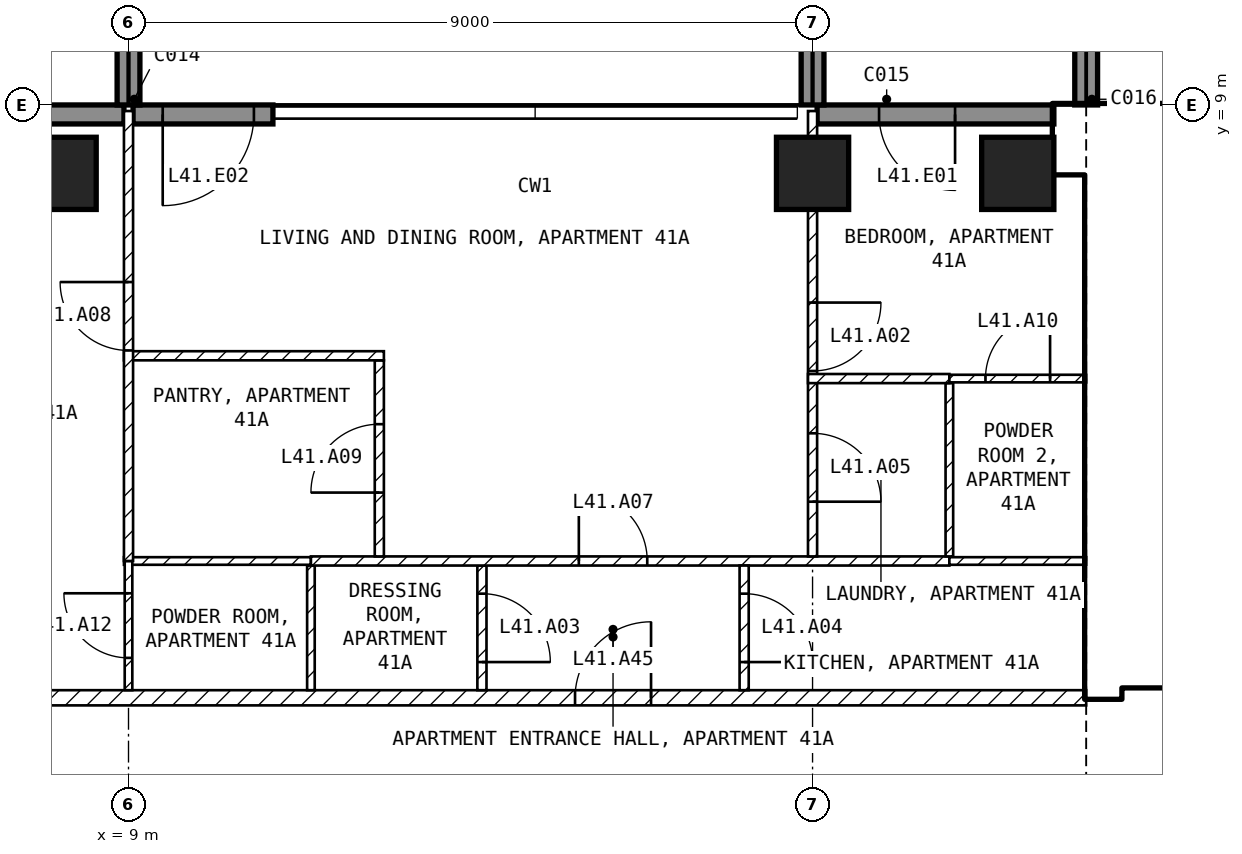
"""IFC4 building model, lengths in metres.
Left out: names, types, materials, properties, quantities, classifications, styles, units other than length and angle.
Written with IfcOpenShell. Run it as: python <this file> out.ifc"""

import sys

from ifc_helpers import new_model, si_unit, direction, frame, frame_2d, origin, origin_2d, place, context, subcontext, project, spatial, rectangle, extrude, element, fill, save


model = new_model("IFC4")
c1 = context("Model", 3, precision=1e-05, world=origin(), true_north=direction((0.0, 1.0)))
c2 = subcontext(c1, "Body", "Model", "MODEL_VIEW")
j1 = project(units=[si_unit("LENGTHUNIT", "METRE"), si_unit("PLANEANGLEUNIT", "RADIAN")], contexts=[c1])
p1 = place(None, origin())
s1 = spatial("IfcSite", under=j1, at=p1, CompositionType="ELEMENT")
p2 = place(p1, origin())
s2 = spatial("IfcBuilding", under=s1, at=p2, CompositionType="ELEMENT")
p3 = place(p2, frame((0.0, 0.0, 170.1)))
s3 = spatial("IfcBuildingStorey", under=s2, at=p3, CompositionType="ELEMENT", Elevation=170.1)
for number, where, z_axis, x_axis in (
    (1, (8.1, 8.1, -0.25), (0.0, 0.0, 1.0), (1.0, 0.0, 0.0)),
    (2, (18.0, 8.1, -0.25), (0.0, 0.0, 1.0), (1.0, 0.0, 0.0)),
    (3, (20.7, 8.1, -0.25), (0.0, 0.0, 1.0), (1.0, 0.0, 0.0)),
):
    element("IfcColumn", number, at=place(p3, frame(where, z_axis=z_axis, x_axis=x_axis)), inside=s3, PredefinedType="COLUMN", context=c2, shape_type="SweptSolid", body=[
        extrude(rectangle(XDim=0.95, YDim=0.95, at=origin_2d()), origin(), (0.0, 0.0, 1.0), 3.5),
    ])
p4 = place(p3, frame((21.175, 8.875, 0.0), z_axis=(0.0, 0.0, 1.0), x_axis=(-1.0, 0.0, 0.0)))
e4 = element("IfcWall", 4, at=p4, inside=s3, PredefinedType="SOLIDWALL", context=c2, shape_type="SweptSolid", body=[
    extrude(rectangle(XDim=3.115, YDim=0.25, at=frame_2d((1.558, 0.0))), origin(), (0.0, 0.0, 1.0), 3.25),
])
p5 = place(p4, frame((1.3, 0.0, 0.0)))
e5 = element("IfcOpeningElement", 5, at=p5, cuts=e4, PredefinedType="OPENING", context=c2, shape_type="SweptSolid", body=[
    extrude(rectangle(XDim=1.0, YDim=2.4, at=frame_2d((0.5, 1.2))), frame((0.0, 0.135, 0.0), z_axis=(0.0, -1.0, 0.0), x_axis=(1.0, 0.0, 0.0)), (0.0, 0.0, 1.0), 0.27),
])
p6 = place(p3, frame((10.9, 8.875, 0.0), z_axis=(0.0, 0.0, 1.0), x_axis=(-1.0, 0.0, 0.0)))
e6 = element("IfcWall", 6, at=p6, inside=s3, PredefinedType="SOLIDWALL", context=c2, shape_type="SweptSolid", body=[
    extrude(rectangle(XDim=1.84, YDim=0.25, at=frame_2d((0.92, 0.0))), origin(), (0.0, 0.0, 1.0), 3.25),
])
p7 = place(p6, frame((0.25, 0.0, 0.0)))
e7 = element("IfcOpeningElement", 7, at=p7, cuts=e6, PredefinedType="OPENING", context=c2, shape_type="SweptSolid", body=[
    extrude(rectangle(XDim=1.2, YDim=2.4, at=frame_2d((0.6, 1.2))), frame((0.0, 0.135, 0.0), z_axis=(0.0, -1.0, 0.0), x_axis=(1.0, 0.0, 0.0)), (0.0, 0.0, 1.0), 0.27),
])
p8 = place(p3, frame((8.94, 8.875, 0.0), z_axis=(0.0, 0.0, 1.0), x_axis=(-1.0, 0.0, 0.0)))
e8 = element("IfcWall", 8, at=p8, inside=s3, PredefinedType="SOLIDWALL", context=c2, shape_type="SweptSolid", body=[
    extrude(rectangle(XDim=3.115, YDim=0.25, at=frame_2d((1.558, 0.0))), origin(), (0.0, 0.0, 1.0), 3.25),
])
p9 = place(p8, frame((1.665, 0.0, 0.0)))
e9 = element("IfcOpeningElement", 9, at=p9, cuts=e8, PredefinedType="OPENING", context=c2, shape_type="SweptSolid", body=[
    extrude(rectangle(XDim=1.2, YDim=2.4, at=frame_2d((0.6, 1.2))), frame((0.0, 0.135, 0.0), z_axis=(0.0, -1.0, 0.0), x_axis=(1.0, 0.0, 0.0)), (0.0, 0.0, 1.0), 0.27),
])
for number, where, z_axis, x_axis in (
    (10, (9.0, 9.0, 0.0), (0.0, 0.0, 1.0), (0.0, 1.0, 0.0)),
    (11, (18.0, 9.0, 0.0), (0.0, 0.0, 1.0), (0.0, 1.0, 0.0)),
    (12, (21.6, 9.0, 0.0), (0.0, 0.0, 1.0), (0.0, 1.0, 0.0)),
):
    element("IfcWall", number, at=place(p3, frame(where, z_axis=z_axis, x_axis=x_axis)), inside=s3, PredefinedType="SOLIDWALL", context=c2, shape_type="SweptSolid", body=[
        extrude(rectangle(XDim=2.7, YDim=0.3, at=frame_2d((1.35, 0.0))), origin(), (0.0, 0.0, 1.0), 3.25),
    ])
p10 = place(p3, frame((21.175, 8.55, 0.0), z_axis=(0.0, 0.0, 1.0), x_axis=(1.0, 0.0, 0.0)))
e13 = element("IfcWall", 13, at=p10, inside=s3, PredefinedType="SHEAR", context=c2, shape_type="SweptSolid", body=[
    extrude(rectangle(XDim=8.425, YDim=0.9, at=frame_2d((4.212, 0.0))), origin(), (0.0, 0.0, 1.0), 3.25),
])
p11 = place(p3, frame((21.825, 1.2, 0.0), z_axis=(0.0, 0.0, 1.0), x_axis=(0.0, 1.0, 0.0)))
e14 = element("IfcWall", 14, at=p11, inside=s3, PredefinedType="SHEAR", context=c2, shape_type="SweptSolid", body=[
    extrude(rectangle(XDim=6.9, YDim=0.45, at=frame_2d((3.45, 0.0))), origin(), (0.0, 0.0, 1.0), 3.25),
])
p12 = place(p3, frame((22.05, 1.45, 0.0), z_axis=(0.0, 0.0, 1.0), x_axis=(1.0, 0.0, 0.0)))
e15 = element("IfcWall", 15, at=p12, inside=s3, PredefinedType="SOLIDWALL", context=c2, shape_type="SweptSolid", body=[
    extrude(rectangle(XDim=11.15, YDim=0.2, at=frame_2d((5.575, 0.0))), origin(), (0.0, 0.0, 1.0), 3.25),
])
p13 = place(p12, frame((0.75, 0.0, 0.0)))
e16 = element("IfcOpeningElement", 16, at=p13, cuts=e15, PredefinedType="OPENING", context=c2, shape_type="SweptSolid", body=[
    extrude(rectangle(XDim=1.0, YDim=2.1, at=frame_2d((0.5, 1.05))), frame((0.0, 0.11, 0.0), z_axis=(0.0, -1.0, 0.0), x_axis=(1.0, 0.0, 0.0)), (0.0, 0.0, 1.0), 0.22),
])
p14 = place(p12, frame((3.25, 0.0, 0.0)))
e17 = element("IfcOpeningElement", 17, at=p14, cuts=e15, PredefinedType="OPENING", context=c2, shape_type="SweptSolid", body=[
    extrude(rectangle(XDim=1.0, YDim=2.1, at=frame_2d((0.5, 1.05))), frame((0.0, 0.11, 0.0), z_axis=(0.0, -1.0, 0.0), x_axis=(1.0, 0.0, 0.0)), (0.0, 0.0, 1.0), 0.22),
])
p15 = place(p12, frame((9.15, 0.0, 0.0)))
e18 = element("IfcOpeningElement", 18, at=p15, cuts=e15, PredefinedType="OPENING", context=c2, shape_type="SweptSolid", body=[
    extrude(rectangle(XDim=0.9, YDim=2.1, at=frame_2d((0.45, 1.05))), frame((0.0, 0.11, 0.0), z_axis=(0.0, -1.0, 0.0), x_axis=(1.0, 0.0, 0.0)), (0.0, 0.0, 1.0), 0.22),
])
p16 = place(p3, frame((22.05, 5.15, 0.0), z_axis=(0.0, 0.0, 1.0), x_axis=(1.0, 0.0, 0.0)))
e19 = element("IfcWall", 19, at=p16, inside=s3, PredefinedType="SOLIDWALL", context=c2, shape_type="SweptSolid", body=[
    extrude(rectangle(XDim=6.3, YDim=0.2, at=frame_2d((3.15, 0.0))), origin(), (0.0, 0.0, 1.0), 3.25),
])
p17 = place(p16, frame((0.2, 0.0, 0.0)))
e20 = element("IfcOpeningElement", 20, at=p17, cuts=e19, PredefinedType="OPENING", context=c2, shape_type="SweptSolid", body=[
    extrude(rectangle(XDim=1.0, YDim=2.1, at=frame_2d((0.5, 1.05))), frame((0.0, 0.11, 0.0), z_axis=(0.0, -1.0, 0.0), x_axis=(1.0, 0.0, 0.0)), (0.0, 0.0, 1.0), 0.22),
])
p18 = place(p3, frame((4.4, 1.2, 0.0), z_axis=(0.0, 0.0, 1.0), x_axis=(1.0, 0.0, 0.0)))
e21 = element("IfcWall", 21, at=p18, inside=s3, PredefinedType="PARTITIONING", context=c2, shape_type="SweptSolid", body=[
    extrude(rectangle(XDim=17.2, YDim=0.2, at=frame_2d((8.6, 0.0))), origin(), (0.0, 0.0, 1.0), 3.25),
])
p19 = place(p18, frame((10.475, 0.0, 0.0)))
e22 = element("IfcOpeningElement", 22, at=p19, cuts=e21, PredefinedType="OPENING", context=c2, shape_type="SweptSolid", body=[
    extrude(rectangle(XDim=1.0, YDim=2.1, at=frame_2d((0.5, 1.05))), frame((0.0, 0.11, 0.0), z_axis=(0.0, -1.0, 0.0), x_axis=(1.0, 0.0, 0.0)), (0.0, 0.0, 1.0), 0.22),
])
p20 = place(p3, frame((11.4, 2.94, 0.0), z_axis=(0.0, 0.0, 1.0), x_axis=(0.0, -1.0, 0.0)))
e23 = element("IfcWall", 23, at=p20, inside=s3, PredefinedType="PARTITIONING", context=c2, shape_type="SweptSolid", body=[
    extrude(rectangle(XDim=1.64, YDim=0.1, at=frame_2d((0.82, 0.0))), origin(), (0.0, 0.0, 1.0), 3.25),
])
p21 = place(p3, frame((8.94, 3.0, 0.0), z_axis=(0.0, 0.0, 1.0), x_axis=(1.0, 0.0, 0.0)))
e24 = element("IfcWall", 24, at=p21, inside=s3, PredefinedType="PARTITIONING", context=c2, shape_type="SweptSolid", body=[
    extrude(rectangle(XDim=2.46, YDim=0.1, at=frame_2d((1.23, 0.0))), origin(), (0.0, 0.0, 1.0), 3.25),
])
p22 = place(p3, frame((9.0, 1.3, 0.0), z_axis=(0.0, 0.0, 1.0), x_axis=(0.0, 1.0, 0.0)))
e25 = element("IfcWall", 25, at=p22, inside=s3, PredefinedType="PARTITIONING", context=c2, shape_type="SweptSolid", body=[
    extrude(rectangle(XDim=1.7, YDim=0.1, at=frame_2d((0.85, 0.0))), origin(), (0.0, 0.0, 1.0), 3.25),
])
p23 = place(p22, frame((0.425, 0.0, 0.0)))
e26 = element("IfcOpeningElement", 26, at=p23, cuts=e25, PredefinedType="OPENING", context=c2, shape_type="SweptSolid", body=[
    extrude(rectangle(XDim=0.85, YDim=2.1, at=frame_2d((0.425, 1.05))), frame((0.0, 0.06, 0.0), z_axis=(0.0, -1.0, 0.0), x_axis=(1.0, 0.0, 0.0)), (0.0, 0.0, 1.0), 0.12),
])
p24 = place(p3, frame((13.65, 2.94, 0.0), z_axis=(0.0, 0.0, 1.0), x_axis=(0.0, -1.0, 0.0)))
e27 = element("IfcWall", 27, at=p24, inside=s3, PredefinedType="PARTITIONING", context=c2, shape_type="SweptSolid", body=[
    extrude(rectangle(XDim=1.64, YDim=0.12, at=frame_2d((0.82, 0.0))), origin(), (0.0, 0.0, 1.0), 3.25),
])
p25 = place(p24, frame((0.37, 0.0, 0.0)))
e28 = element("IfcOpeningElement", 28, at=p25, cuts=e27, PredefinedType="OPENING", context=c2, shape_type="SweptSolid", body=[
    extrude(rectangle(XDim=0.9, YDim=2.1, at=frame_2d((0.45, 1.05))), frame((0.0, 0.07, 0.0), z_axis=(0.0, -1.0, 0.0), x_axis=(1.0, 0.0, 0.0)), (0.0, 0.0, 1.0), 0.14),
])
p26 = place(p3, frame((11.4, 3.0, 0.0), z_axis=(0.0, 0.0, 1.0), x_axis=(1.0, 0.0, 0.0)))
e29 = element("IfcWall", 29, at=p26, inside=s3, PredefinedType="PARTITIONING", context=c2, shape_type="SweptSolid", body=[
    extrude(rectangle(XDim=8.4, YDim=0.12, at=frame_2d((4.2, 0.0))), origin(), (0.0, 0.0, 1.0), 3.25),
])
p27 = place(p26, frame((3.525, 0.0, 0.0)))
e30 = element("IfcOpeningElement", 30, at=p27, cuts=e29, PredefinedType="OPENING", context=c2, shape_type="SweptSolid", body=[
    extrude(rectangle(XDim=0.9, YDim=2.1, at=frame_2d((0.45, 1.05))), frame((0.0, 0.07, 0.0), z_axis=(0.0, -1.0, 0.0), x_axis=(1.0, 0.0, 0.0)), (0.0, 0.0, 1.0), 0.14),
])
p28 = place(p3, frame((17.1, 2.94, 0.0), z_axis=(0.0, 0.0, 1.0), x_axis=(0.0, -1.0, 0.0)))
e31 = element("IfcWall", 31, at=p28, inside=s3, PredefinedType="PARTITIONING", context=c2, shape_type="SweptSolid", body=[
    extrude(rectangle(XDim=1.64, YDim=0.12, at=frame_2d((0.82, 0.0))), origin(), (0.0, 0.0, 1.0), 3.25),
])
p29 = place(p28, frame((0.37, 0.0, 0.0)))
e32 = element("IfcOpeningElement", 32, at=p29, cuts=e31, PredefinedType="OPENING", context=c2, shape_type="SweptSolid", body=[
    extrude(rectangle(XDim=0.9, YDim=2.1, at=frame_2d((0.45, 1.05))), frame((0.0, 0.07, 0.0), z_axis=(0.0, -1.0, 0.0), x_axis=(1.0, 0.0, 0.0)), (0.0, 0.0, 1.0), 0.14),
])
p30 = place(p3, frame((19.8, 3.0, 0.0), z_axis=(0.0, 0.0, 1.0), x_axis=(1.0, 0.0, 0.0)))
e33 = element("IfcWall", 33, at=p30, inside=s3, PredefinedType="PARTITIONING", context=c2, shape_type="SweptSolid", body=[
    extrude(rectangle(XDim=1.8, YDim=0.1, at=frame_2d((0.9, 0.0))), origin(), (0.0, 0.0, 1.0), 3.25),
])
p31 = place(p3, frame((12.3, 3.06, 0.0), z_axis=(0.0, 0.0, 1.0), x_axis=(0.0, 1.0, 0.0)))
e34 = element("IfcWall", 34, at=p31, inside=s3, PredefinedType="PARTITIONING", context=c2, shape_type="SweptSolid", body=[
    extrude(rectangle(XDim=2.58, YDim=0.12, at=frame_2d((1.29, 0.0))), origin(), (0.0, 0.0, 1.0), 3.25),
])
p32 = place(p31, frame((0.84, 0.0, 0.0)))
e35 = element("IfcOpeningElement", 35, at=p32, cuts=e34, PredefinedType="OPENING", context=c2, shape_type="SweptSolid", body=[
    extrude(rectangle(XDim=0.9, YDim=2.1, at=frame_2d((0.45, 1.05))), frame((0.0, 0.07, 0.0), z_axis=(0.0, -1.0, 0.0), x_axis=(1.0, 0.0, 0.0)), (0.0, 0.0, 1.0), 0.14),
])
p33 = place(p3, frame((12.36, 5.7, 0.0), z_axis=(0.0, 0.0, 1.0), x_axis=(-1.0, 0.0, 0.0)))
e36 = element("IfcWall", 36, at=p33, inside=s3, PredefinedType="PARTITIONING", context=c2, shape_type="SweptSolid", body=[
    extrude(rectangle(XDim=3.42, YDim=0.12, at=frame_2d((1.71, 0.0))), origin(), (0.0, 0.0, 1.0), 3.25),
])
p34 = place(p3, frame((18.0, 8.92, 0.0), z_axis=(0.0, 0.0, 1.0), x_axis=(0.0, -1.0, 0.0)))
e37 = element("IfcWall", 37, at=p34, inside=s3, PredefinedType="PARTITIONING", context=c2, shape_type="SweptSolid", body=[
    extrude(rectangle(XDim=5.86, YDim=0.12, at=frame_2d((2.93, 0.0))), origin(), (0.0, 0.0, 1.0), 2.48),
])
p35 = place(p34, frame((2.52, 0.0, 0.0)))
e38 = element("IfcOpeningElement", 38, at=p35, cuts=e37, PredefinedType="OPENING", context=c2, shape_type="SweptSolid", body=[
    extrude(rectangle(XDim=0.9, YDim=2.1, at=frame_2d((0.45, 1.05))), frame((0.0, 0.07, 0.0), z_axis=(0.0, -1.0, 0.0), x_axis=(1.0, 0.0, 0.0)), (0.0, 0.0, 1.0), 0.14),
])
p36 = place(p34, frame((4.24, 0.0, 0.0)))
e39 = element("IfcOpeningElement", 39, at=p36, cuts=e37, PredefinedType="OPENING", context=c2, shape_type="SweptSolid", body=[
    extrude(rectangle(XDim=0.9, YDim=2.1, at=frame_2d((0.45, 1.05))), frame((0.0, 0.07, 0.0), z_axis=(0.0, -1.0, 0.0), x_axis=(1.0, 0.0, 0.0)), (0.0, 0.0, 1.0), 0.14),
])
p37 = place(p3, frame((9.0, 3.0, 0.0), z_axis=(0.0, 0.0, 1.0), x_axis=(0.0, 1.0, 0.0)))
e40 = element("IfcWall", 40, at=p37, inside=s3, PredefinedType="PARTITIONING", context=c2, shape_type="SweptSolid", body=[
    extrude(rectangle(XDim=5.92, YDim=0.12, at=frame_2d((2.96, 0.0))), origin(), (0.0, 0.0, 1.0), 3.25),
])
p38 = place(p37, frame((2.77, 0.0, 0.0)))
e41 = element("IfcOpeningElement", 41, at=p38, cuts=e40, PredefinedType="OPENING", context=c2, shape_type="SweptSolid", body=[
    extrude(rectangle(XDim=0.9, YDim=2.1, at=frame_2d((0.45, 1.05))), frame((0.0, 0.07, 0.0), z_axis=(0.0, -1.0, 0.0), x_axis=(1.0, 0.0, 0.0)), (0.0, 0.0, 1.0), 0.14),
])
p39 = place(p3, frame((19.8, 5.34, 0.0), z_axis=(0.0, 0.0, 1.0), x_axis=(0.0, -1.0, 0.0)))
e42 = element("IfcWall", 42, at=p39, inside=s3, PredefinedType="PARTITIONING", context=c2, shape_type="SweptSolid", body=[
    extrude(rectangle(XDim=2.28, YDim=0.1, at=frame_2d((1.14, 0.0))), origin(), (0.0, 0.0, 1.0), 3.25),
])
p40 = place(p3, frame((17.94, 5.4, 0.0), z_axis=(0.0, 0.0, 1.0), x_axis=(1.0, 0.0, 0.0)))
e43 = element("IfcWall", 43, at=p40, inside=s3, PredefinedType="PARTITIONING", context=c2, shape_type="SweptSolid", body=[
    extrude(rectangle(XDim=1.86, YDim=0.12, at=frame_2d((0.93, 0.0))), origin(), (0.0, 0.0, 1.0), 3.25),
])
p41 = place(p3, frame((19.8, 5.4, 0.0), z_axis=(0.0, 0.0, 1.0), x_axis=(1.0, 0.0, 0.0)))
e44 = element("IfcWall", 44, at=p41, inside=s3, PredefinedType="PARTITIONING", context=c2, shape_type="SweptSolid", body=[
    extrude(rectangle(XDim=1.8, YDim=0.1, at=frame_2d((0.9, 0.0))), origin(), (0.0, 0.0, 1.0), 3.25),
])
p42 = place(p41, frame((0.475, 0.0, 0.0)))
e45 = element("IfcOpeningElement", 45, at=p42, cuts=e44, PredefinedType="OPENING", context=c2, shape_type="SweptSolid", body=[
    extrude(rectangle(XDim=0.85, YDim=2.1, at=frame_2d((0.425, 1.05))), frame((0.0, 0.06, 0.0), z_axis=(0.0, -1.0, 0.0), x_axis=(1.0, 0.0, 0.0)), (0.0, 0.0, 1.0), 0.12),
])
p43 = place(p5, origin())
e46 = element("IfcDoor", 46, at=p43, inside=s3, OperationType="SINGLE_SWING_LEFT", PredefinedType="DOOR", context=c2, shape_type="SweptSolid", body=[
    extrude(rectangle(XDim=1.0, YDim=2.4, at=frame_2d((0.5, 1.2))), frame((0.0, 0.025, 0.0), z_axis=(0.0, -1.0, 0.0), x_axis=(1.0, 0.0, 0.0)), (0.0, 0.0, 1.0), 0.05),
])
fill(e5, e46)
p44 = place(p7, origin())
e47 = element("IfcDoor", 47, at=p44, inside=s3, OperationType="SINGLE_SWING_RIGHT", PredefinedType="DOOR", context=c2, shape_type="SweptSolid", body=[
    extrude(rectangle(XDim=1.2, YDim=2.4, at=frame_2d((0.6, 1.2))), frame((0.0, 0.025, 0.0), z_axis=(0.0, -1.0, 0.0), x_axis=(1.0, 0.0, 0.0)), (0.0, 0.0, 1.0), 0.05),
])
fill(e7, e47)
p45 = place(p17, origin())
e48 = element("IfcDoor", 48, at=p45, inside=s3, OperationType="SINGLE_SWING_LEFT", PredefinedType="DOOR", context=c2, shape_type="SweptSolid", body=[
    extrude(rectangle(XDim=1.0, YDim=2.1, at=frame_2d((0.5, 1.05))), frame((0.0, 0.025, 0.0), z_axis=(0.0, -1.0, 0.0), x_axis=(1.0, 0.0, 0.0)), (0.0, 0.0, 1.0), 0.05),
])
fill(e20, e48)
p46 = place(p35, origin())
e49 = element("IfcDoor", 49, at=p46, inside=s3, OperationType="SINGLE_SWING_LEFT", PredefinedType="DOOR", context=c2, shape_type="SweptSolid", body=[
    extrude(rectangle(XDim=0.9, YDim=2.1, at=frame_2d((0.45, 1.05))), frame((0.0, 0.025, 0.0), z_axis=(0.0, -1.0, 0.0), x_axis=(1.0, 0.0, 0.0)), (0.0, 0.0, 1.0), 0.05),
])
fill(e38, e49)
p47 = place(p25, origin())
e50 = element("IfcDoor", 50, at=p47, inside=s3, OperationType="SINGLE_SWING_RIGHT", PredefinedType="DOOR", context=c2, shape_type="SweptSolid", body=[
    extrude(rectangle(XDim=0.9, YDim=2.1, at=frame_2d((0.45, 1.05))), frame((0.0, 0.025, 0.0), z_axis=(0.0, -1.0, 0.0), x_axis=(1.0, 0.0, 0.0)), (0.0, 0.0, 1.0), 0.05),
])
fill(e28, e50)
p48 = place(p29, origin())
e51 = element("IfcDoor", 51, at=p48, inside=s3, OperationType="SINGLE_SWING_RIGHT", PredefinedType="DOOR", context=c2, shape_type="SweptSolid", body=[
    extrude(rectangle(XDim=0.9, YDim=2.1, at=frame_2d((0.45, 1.05))), frame((0.0, 0.025, 0.0), z_axis=(0.0, -1.0, 0.0), x_axis=(1.0, 0.0, 0.0)), (0.0, 0.0, 1.0), 0.05),
])
fill(e32, e51)
p49 = place(p36, origin())
e52 = element("IfcDoor", 52, at=p49, inside=s3, OperationType="SINGLE_SWING_RIGHT", PredefinedType="DOOR", context=c2, shape_type="SweptSolid", body=[
    extrude(rectangle(XDim=0.9, YDim=2.1, at=frame_2d((0.45, 1.05))), frame((0.0, 0.025, 0.0), z_axis=(0.0, -1.0, 0.0), x_axis=(1.0, 0.0, 0.0)), (0.0, 0.0, 1.0), 0.05),
])
fill(e39, e52)
p50 = place(p27, origin())
e53 = element("IfcDoor", 53, at=p50, inside=s3, OperationType="SINGLE_SWING_LEFT", PredefinedType="DOOR", context=c2, shape_type="SweptSolid", body=[
    extrude(rectangle(XDim=0.9, YDim=2.1, at=frame_2d((0.45, 1.05))), frame((0.0, 0.025, 0.0), z_axis=(0.0, -1.0, 0.0), x_axis=(1.0, 0.0, 0.0)), (0.0, 0.0, 1.0), 0.05),
])
fill(e30, e53)
p51 = place(p38, origin())
e54 = element("IfcDoor", 54, at=p51, inside=s3, OperationType="SINGLE_SWING_RIGHT", PredefinedType="DOOR", context=c2, shape_type="SweptSolid", body=[
    extrude(rectangle(XDim=0.9, YDim=2.1, at=frame_2d((0.45, 1.05))), frame((0.0, 0.025, 0.0), z_axis=(0.0, -1.0, 0.0), x_axis=(1.0, 0.0, 0.0)), (0.0, 0.0, 1.0), 0.05),
])
fill(e41, e54)
p52 = place(p32, origin())
e55 = element("IfcDoor", 55, at=p52, inside=s3, OperationType="SINGLE_SWING_LEFT", PredefinedType="DOOR", context=c2, shape_type="SweptSolid", body=[
    extrude(rectangle(XDim=0.9, YDim=2.1, at=frame_2d((0.45, 1.05))), frame((0.0, 0.025, 0.0), z_axis=(0.0, -1.0, 0.0), x_axis=(1.0, 0.0, 0.0)), (0.0, 0.0, 1.0), 0.05),
])
fill(e35, e55)
p53 = place(p42, origin())
e56 = element("IfcDoor", 56, at=p53, inside=s3, OperationType="SINGLE_SWING_RIGHT", PredefinedType="DOOR", context=c2, shape_type="SweptSolid", body=[
    extrude(rectangle(XDim=0.85, YDim=2.1, at=frame_2d((0.425, 1.05))), frame((0.0, 0.025, 0.0), z_axis=(0.0, -1.0, 0.0), x_axis=(1.0, 0.0, 0.0)), (0.0, 0.0, 1.0), 0.05),
])
fill(e45, e56)
p54 = place(p23, origin())
e57 = element("IfcDoor", 57, at=p54, inside=s3, OperationType="SINGLE_SWING_RIGHT", PredefinedType="DOOR", context=c2, shape_type="SweptSolid", body=[
    extrude(rectangle(XDim=0.85, YDim=2.1, at=frame_2d((0.425, 1.05))), frame((0.0, 0.025, 0.0), z_axis=(0.0, -1.0, 0.0), x_axis=(1.0, 0.0, 0.0)), (0.0, 0.0, 1.0), 0.05),
])
fill(e26, e57)
p55 = place(p19, origin())
e58 = element("IfcDoor", 58, at=p55, inside=s3, OperationType="SINGLE_SWING_RIGHT", PredefinedType="DOOR", context=c2, shape_type="SweptSolid", body=[
    extrude(rectangle(XDim=1.0, YDim=2.1, at=frame_2d((0.5, 1.05))), frame((0.0, 0.025, 0.0), z_axis=(0.0, -1.0, 0.0), x_axis=(1.0, 0.0, 0.0)), (0.0, 0.0, 1.0), 0.05),
])
fill(e22, e58)
save(model, sys.argv[1])
